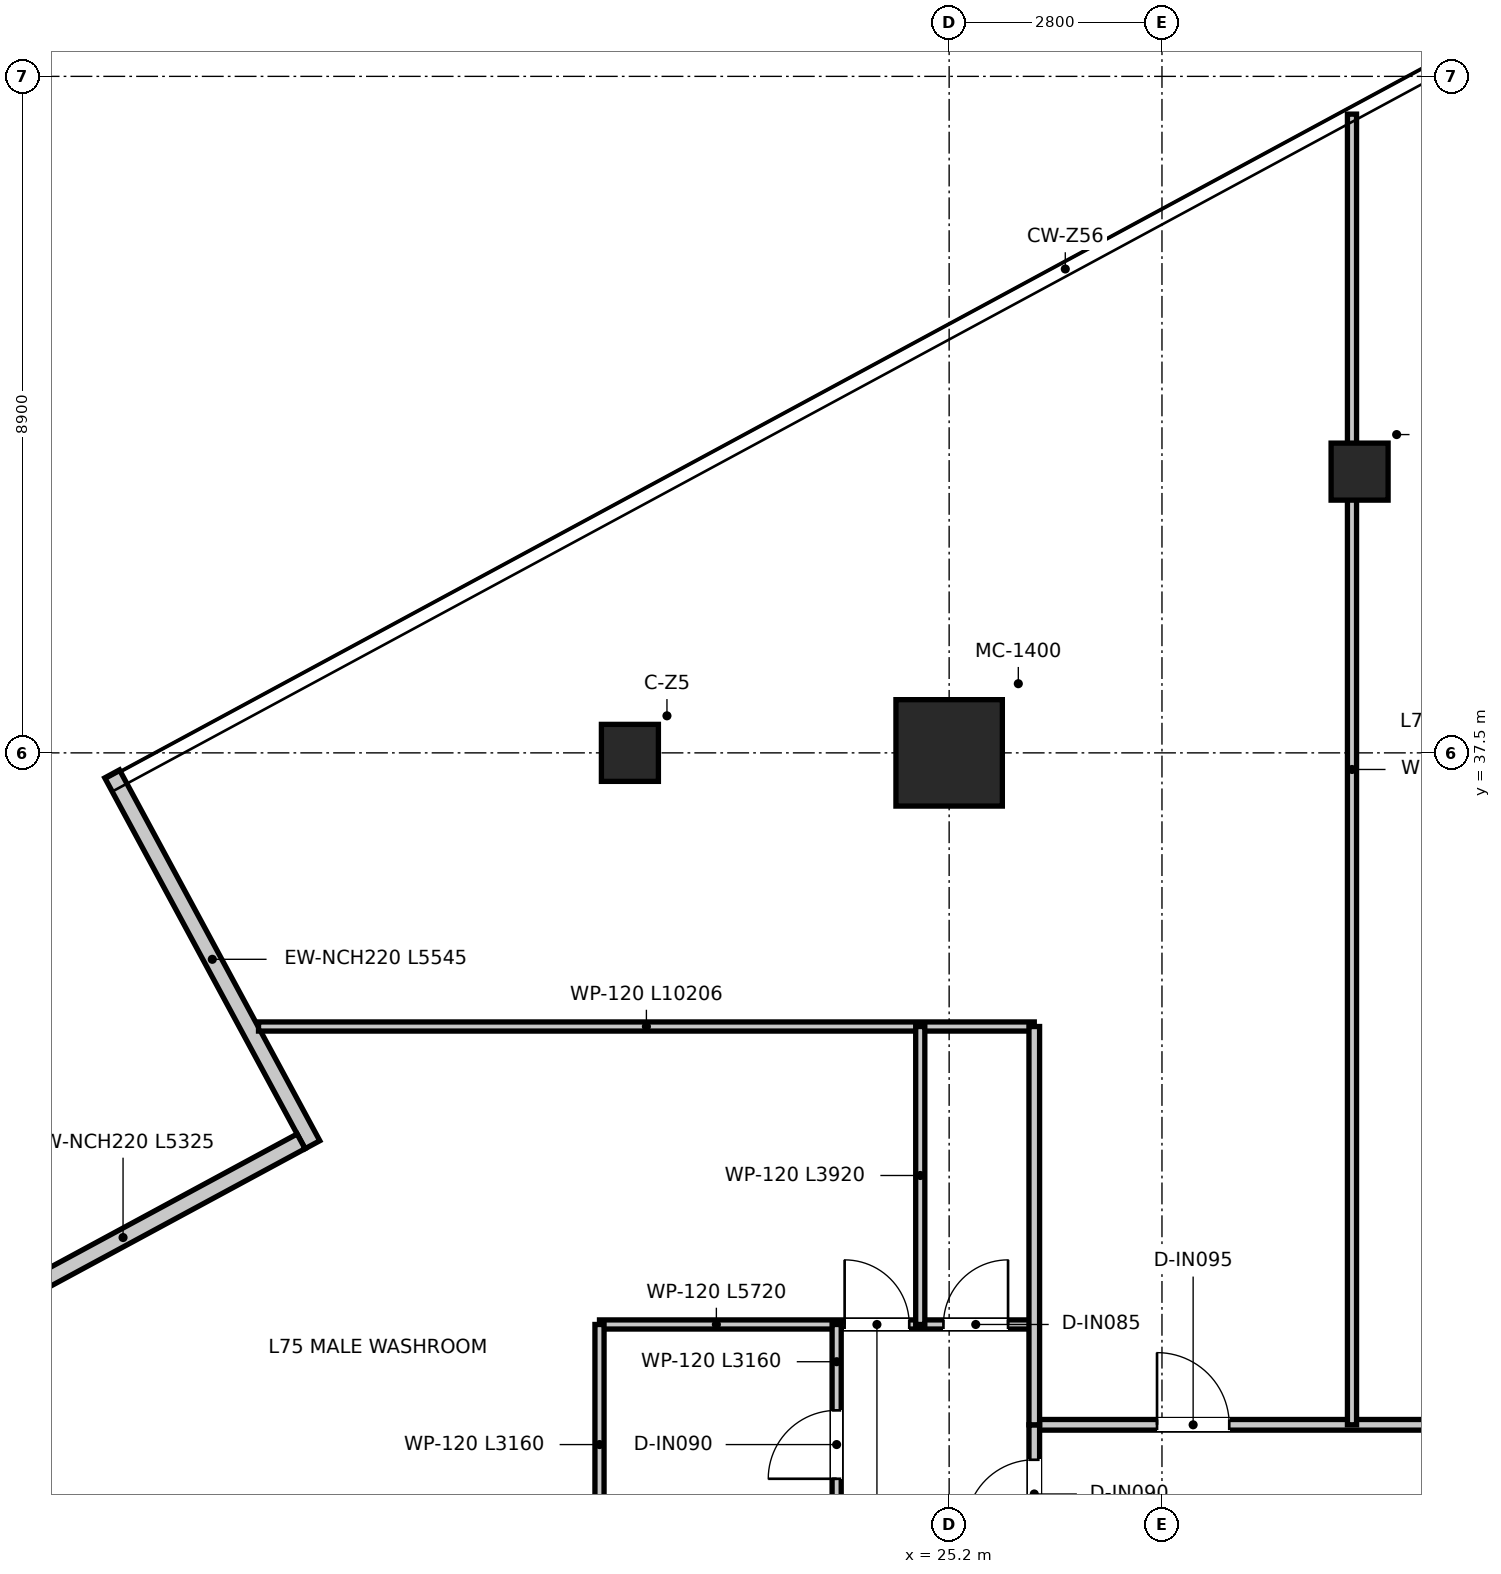
"""IFC4 building model, lengths in metres.
Left out: names, types, materials, properties, quantities, classifications, styles, units other than length and angle.
Written with IfcOpenShell. Run it as: python <this file> out.ifc"""

import sys

from ifc_helpers import new_model, si_unit, direction, frame, frame_2d, origin, origin_2d, place, context, subcontext, project, spatial, rectangle, extrude, source, transform, mapped, element, fill, save


model = new_model("IFC4")
c1 = context("Model", 3, precision=1e-05, world=origin(), true_north=direction((0.0, 1.0)))
c2 = subcontext(c1, "Body", "Model", "MODEL_VIEW")
j1 = project(units=[si_unit("LENGTHUNIT", "METRE"), si_unit("PLANEANGLEUNIT", "RADIAN")], contexts=[c1])
p1 = place(None, origin())
s1 = spatial("IfcSite", under=j1, at=p1, CompositionType="ELEMENT")
p2 = place(p1, origin())
s2 = spatial("IfcBuilding", under=s1, at=p2, CompositionType="ELEMENT")
p3 = place(p2, frame((0.0, 0.0, 306.9)))
s3 = spatial("IfcBuildingStorey", under=s2, at=p3, CompositionType="ELEMENT", Elevation=306.9)
m1 = source(origin(), c2, "Body", "SweptSolid", [
    extrude(rectangle(XDim=1.4, YDim=1.4, at=origin_2d()), origin(), (0.0, 0.0, 1.0), 3.95),
])
p4 = place(p3, frame((25.2, 37.5, 0.0), z_axis=(0.0, 0.0, 1.0), x_axis=(1.0, 0.0, 0.0)))
e1 = element("IfcColumn", 1, at=p4, inside=s3, PredefinedType="USERDEFINED", context=c2, shape_type="MappedRepresentation", body=[
    mapped(m1, transform((0.0, 0.0, 0.0), x_axis=(1.0, 0.0, 0.0), y_axis=(0.0, 1.0, 0.0), z_axis=(0.0, 0.0, 1.0), scale=1.0)),
])
m2 = source(origin(), c2, "Body", "SweptSolid", [
    extrude(rectangle(XDim=0.75, YDim=0.75, at=origin_2d()), origin(), (0.0, 0.0, 1.0), 3.95),
])
for number, where, z_axis, x_axis in (
    (2, (21.0, 37.5, 0.0), (0.0, 0.0, 1.0), (1.0, 0.0, 0.0)),
    (3, (30.6, 41.2, 0.0), (0.0, 0.0, 1.0), (1.0, 0.0, 0.0)),
):
    element("IfcColumn", number, at=place(p3, frame(where, z_axis=z_axis, x_axis=x_axis)), inside=s3, PredefinedType="COLUMN", context=c2, shape_type="MappedRepresentation", body=[
        mapped(m2, transform((0.0, 0.0, 0.0), x_axis=(1.0, 0.0, 0.0), y_axis=(0.0, 1.0, 0.0), z_axis=(0.0, 0.0, 1.0), scale=1.0)),
    ])
p5 = place(p3, frame((14.188, 37.223, 0.0), z_axis=(0.0, 0.0, 1.0), x_axis=(0.475257315172, -0.879846852796, 0.0)))
e4 = element("IfcWall", 4, at=p5, inside=s3, PredefinedType="ELEMENTEDWALL", context=c2, shape_type="SweptSolid", body=[
    extrude(rectangle(XDim=5.545, YDim=0.22, at=frame_2d((2.772, 0.0))), origin(), (0.0, 0.0, 1.0), 3.67),
])
p6 = place(p3, frame((16.674, 32.389, 0.0), z_axis=(0.0, 0.0, 1.0), x_axis=(-0.879859387449, -0.475234108958, 0.0)))
e5 = element("IfcWall", 5, at=p6, inside=s3, PredefinedType="ELEMENTEDWALL", context=c2, shape_type="SweptSolid", body=[
    extrude(rectangle(XDim=5.325, YDim=0.22, at=frame_2d((2.662, 0.0))), origin(), (0.0, 0.0, 1.0), 3.67),
])
p7 = place(p3, frame((26.32, 28.66, 0.0), z_axis=(0.0, 0.0, 1.0), x_axis=(1.0, 0.0, 0.0)))
e6 = element("IfcWall", 6, at=p7, inside=s3, PredefinedType="PARTITIONING", context=c2, shape_type="SweptSolid", body=[
    extrude(rectangle(XDim=19.36, YDim=0.14, at=frame_2d((9.68, 0.0))), origin(), (0.0, 0.0, 1.0), 3.18),
])
p8 = place(p7, frame((1.615, 0.0, 0.0)))
e7 = element("IfcOpeningElement", 7, at=p8, cuts=e6, PredefinedType="OPENING", context=c2, shape_type="SweptSolid", body=[
    extrude(rectangle(XDim=0.95, YDim=2.1, at=frame_2d((0.475, 1.05))), frame((0.0, 0.08, 0.0), z_axis=(0.0, -1.0, 0.0), x_axis=(1.0, 0.0, 0.0)), (0.0, 0.0, 1.0), 0.16),
])
p9 = place(p7, frame((6.455, 0.0, 0.0)))
e8 = element("IfcOpeningElement", 8, at=p9, cuts=e6, PredefinedType="OPENING", context=c2, shape_type="SweptSolid", body=[
    extrude(rectangle(XDim=0.95, YDim=2.1, at=frame_2d((0.475, 1.05))), frame((0.0, 0.08, 0.0), z_axis=(0.0, -1.0, 0.0), x_axis=(1.0, 0.0, 0.0)), (0.0, 0.0, 1.0), 0.16),
])
p10 = place(p7, frame((11.955, 0.0, 0.0)))
e9 = element("IfcOpeningElement", 9, at=p10, cuts=e6, PredefinedType="OPENING", context=c2, shape_type="SweptSolid", body=[
    extrude(rectangle(XDim=0.95, YDim=2.1, at=frame_2d((0.475, 1.05))), frame((0.0, 0.08, 0.0), z_axis=(0.0, -1.0, 0.0), x_axis=(1.0, 0.0, 0.0)), (0.0, 0.0, 1.0), 0.16),
])
p11 = place(p7, frame((16.795, 0.0, 0.0)))
e10 = element("IfcOpeningElement", 10, at=p11, cuts=e6, PredefinedType="OPENING", context=c2, shape_type="SweptSolid", body=[
    extrude(rectangle(XDim=0.95, YDim=2.1, at=frame_2d((0.475, 1.05))), frame((0.0, 0.08, 0.0), z_axis=(0.0, -1.0, 0.0), x_axis=(1.0, 0.0, 0.0)), (0.0, 0.0, 1.0), 0.16),
])
p12 = place(p3, frame((26.32, 9.0, 0.0), z_axis=(0.0, 0.0, 1.0), x_axis=(0.0, 1.0, 0.0)))
e11 = element("IfcWall", 11, at=p12, inside=s3, PredefinedType="PARTITIONING", context=c2, shape_type="SweptSolid", body=[
    extrude(rectangle(XDim=19.66, YDim=0.14, at=frame_2d((9.83, 0.0))), origin(), (0.0, 0.0, 1.0), 3.13),
])
p13 = place(p12, frame((18.3, 0.0, 0.0)))
e12 = element("IfcOpeningElement", 12, at=p13, cuts=e11, PredefinedType="OPENING", context=c2, shape_type="SweptSolid", body=[
    extrude(rectangle(XDim=0.9, YDim=2.1, at=frame_2d((0.45, 1.05))), frame((0.0, 0.08, 0.0), z_axis=(0.0, -1.0, 0.0), x_axis=(1.0, 0.0, 0.0)), (0.0, 0.0, 1.0), 0.16),
])
p14 = place(p12, frame((1.95, 0.0, 0.0)))
e13 = element("IfcOpeningElement", 13, at=p14, cuts=e11, PredefinedType="OPENING", context=c2, shape_type="SweptSolid", body=[
    extrude(rectangle(XDim=0.9, YDim=2.1, at=frame_2d((0.45, 1.05))), frame((0.0, 0.08, 0.0), z_axis=(0.0, -1.0, 0.0), x_axis=(1.0, 0.0, 0.0)), (0.0, 0.0, 1.0), 0.16),
])
p15 = place(p12, frame((10.3, 0.0, 0.0)))
e14 = element("IfcOpeningElement", 14, at=p15, cuts=e11, PredefinedType="OPENING", context=c2, shape_type="SweptSolid", body=[
    extrude(rectangle(XDim=0.9, YDim=2.1, at=frame_2d((0.45, 1.05))), frame((0.0, 0.08, 0.0), z_axis=(0.0, -1.0, 0.0), x_axis=(1.0, 0.0, 0.0)), (0.0, 0.0, 1.0), 0.16),
])
p16 = place(p12, frame((14.96, 0.0, 0.0)))
e15 = element("IfcOpeningElement", 15, at=p16, cuts=e11, PredefinedType="OPENING", context=c2, shape_type="SweptSolid", body=[
    extrude(rectangle(XDim=0.9, YDim=2.1, at=frame_2d((0.45, 1.05))), frame((0.0, 0.08, 0.0), z_axis=(0.0, -1.0, 0.0), x_axis=(1.0, 0.0, 0.0)), (0.0, 0.0, 1.0), 0.16),
])
p17 = place(p3, frame((16.114, 33.9, 0.0), z_axis=(0.0, 0.0, 1.0), x_axis=(1.0, 0.0, 0.0)))
e16 = element("IfcWall", 16, at=p17, inside=s3, PredefinedType="PARTITIONING", context=c2, shape_type="SweptSolid", body=[
    extrude(rectangle(XDim=10.206, YDim=0.12, at=frame_2d((5.103, 0.0))), origin(), (0.0, 0.0, 1.0), 3.13),
])
p18 = place(p3, frame((20.6, 29.98, 0.0), z_axis=(0.0, 0.0, 1.0), x_axis=(1.0, 0.0, 0.0)))
e17 = element("IfcWall", 17, at=p18, inside=s3, PredefinedType="PARTITIONING", context=c2, shape_type="SweptSolid", body=[
    extrude(rectangle(XDim=5.72, YDim=0.12, at=frame_2d((2.86, 0.0))), origin(), (0.0, 0.0, 1.0), 3.13),
])
p19 = place(p18, frame((3.225, 0.0, 0.0)))
e18 = element("IfcOpeningElement", 18, at=p19, cuts=e17, PredefinedType="OPENING", context=c2, shape_type="SweptSolid", body=[
    extrude(rectangle(XDim=0.85, YDim=2.1, at=frame_2d((0.425, 1.05))), frame((0.0, 0.07, 0.0), z_axis=(0.0, -1.0, 0.0), x_axis=(1.0, 0.0, 0.0)), (0.0, 0.0, 1.0), 0.14),
])
p20 = place(p18, frame((4.525, 0.0, 0.0)))
e19 = element("IfcOpeningElement", 19, at=p20, cuts=e17, PredefinedType="OPENING", context=c2, shape_type="SweptSolid", body=[
    extrude(rectangle(XDim=0.85, YDim=2.1, at=frame_2d((0.425, 1.05))), frame((0.0, 0.07, 0.0), z_axis=(0.0, -1.0, 0.0), x_axis=(1.0, 0.0, 0.0)), (0.0, 0.0, 1.0), 0.14),
])
p21 = place(p3, frame((20.6, 26.82, 0.0), z_axis=(0.0, 0.0, 1.0), x_axis=(0.0, 1.0, 0.0)))
e20 = element("IfcWall", 20, at=p21, inside=s3, PredefinedType="PARTITIONING", context=c2, shape_type="SweptSolid", body=[
    extrude(rectangle(XDim=3.16, YDim=0.12, at=frame_2d((1.58, 0.0))), origin(), (0.0, 0.0, 1.0), 3.67),
])
p22 = place(p3, frame((23.72, 26.82, 0.0), z_axis=(0.0, 0.0, 1.0), x_axis=(0.0, 1.0, 0.0)))
e21 = element("IfcWall", 21, at=p22, inside=s3, PredefinedType="PARTITIONING", context=c2, shape_type="SweptSolid", body=[
    extrude(rectangle(XDim=3.16, YDim=0.12, at=frame_2d((1.58, 0.0))), origin(), (0.0, 0.0, 1.0), 3.18),
])
p23 = place(p22, frame((1.13, 0.0, 0.0)))
e22 = element("IfcOpeningElement", 22, at=p23, cuts=e21, PredefinedType="OPENING", context=c2, shape_type="SweptSolid", body=[
    extrude(rectangle(XDim=0.9, YDim=2.1, at=frame_2d((0.45, 1.05))), frame((0.0, 0.07, 0.0), z_axis=(0.0, -1.0, 0.0), x_axis=(1.0, 0.0, 0.0)), (0.0, 0.0, 1.0), 0.14),
])
p24 = place(p3, frame((24.82, 29.98, 0.0), z_axis=(0.0, 0.0, 1.0), x_axis=(0.0, 1.0, 0.0)))
e23 = element("IfcWall", 23, at=p24, inside=s3, PredefinedType="PARTITIONING", context=c2, shape_type="SweptSolid", body=[
    extrude(rectangle(XDim=3.92, YDim=0.12, at=frame_2d((1.96, 0.0))), origin(), (0.0, 0.0, 1.0), 3.31),
])
p25 = place(p3, frame((26.32, 28.66, 0.0), z_axis=(0.0, 0.0, 1.0), x_axis=(0.0, 1.0, 0.0)))
e24 = element("IfcWall", 24, at=p25, inside=s3, PredefinedType="PARTITIONING", context=c2, shape_type="SweptSolid", body=[
    extrude(rectangle(XDim=5.24, YDim=0.14, at=frame_2d((2.62, 0.0))), origin(), (0.0, 0.0, 1.0), 3.43),
])
p26 = place(p3, frame((30.5, 28.66, 0.0), z_axis=(0.0, 0.0, 1.0), x_axis=(0.0, 1.0, 0.0)))
e25 = element("IfcWall", 25, at=p26, inside=s3, PredefinedType="PARTITIONING", context=c2, shape_type="SweptSolid", body=[
    extrude(rectangle(XDim=17.243, YDim=0.12, at=frame_2d((8.622, 0.0))), origin(), (0.0, 0.0, 1.0), 3.13),
])
p27 = place(p13, origin())
e26 = element("IfcDoor", 26, at=p27, inside=s3, OperationType="SINGLE_SWING_LEFT", PredefinedType="DOOR", context=c2, shape_type="SweptSolid", body=[
    extrude(rectangle(XDim=0.9, YDim=2.1, at=frame_2d((0.45, 1.05))), frame((0.0, 0.025, 0.0), z_axis=(0.0, -1.0, 0.0), x_axis=(1.0, 0.0, 0.0)), (0.0, 0.0, 1.0), 0.05),
])
fill(e12, e26)
p28 = place(p19, origin())
e27 = element("IfcDoor", 27, at=p28, inside=s3, OperationType="SINGLE_SWING_LEFT", PredefinedType="DOOR", context=c2, shape_type="SweptSolid", body=[
    extrude(rectangle(XDim=0.85, YDim=2.1, at=frame_2d((0.425, 1.05))), frame((0.0, 0.025, 0.0), z_axis=(0.0, -1.0, 0.0), x_axis=(1.0, 0.0, 0.0)), (0.0, 0.0, 1.0), 0.05),
])
fill(e18, e27)
p29 = place(p20, origin())
e28 = element("IfcDoor", 28, at=p29, inside=s3, OperationType="SINGLE_SWING_RIGHT", PredefinedType="DOOR", context=c2, shape_type="SweptSolid", body=[
    extrude(rectangle(XDim=0.85, YDim=2.1, at=frame_2d((0.425, 1.05))), frame((0.0, 0.025, 0.0), z_axis=(0.0, -1.0, 0.0), x_axis=(1.0, 0.0, 0.0)), (0.0, 0.0, 1.0), 0.05),
])
fill(e19, e28)
p30 = place(p23, origin())
e29 = element("IfcDoor", 29, at=p30, inside=s3, OperationType="SINGLE_SWING_LEFT", PredefinedType="DOOR", context=c2, shape_type="SweptSolid", body=[
    extrude(rectangle(XDim=0.9, YDim=2.1, at=frame_2d((0.45, 1.05))), frame((0.0, 0.025, 0.0), z_axis=(0.0, -1.0, 0.0), x_axis=(1.0, 0.0, 0.0)), (0.0, 0.0, 1.0), 0.05),
])
fill(e22, e29)
p31 = place(p8, origin())
e30 = element("IfcDoor", 30, at=p31, inside=s3, OperationType="SINGLE_SWING_LEFT", PredefinedType="DOOR", context=c2, shape_type="SweptSolid", body=[
    extrude(rectangle(XDim=0.95, YDim=2.1, at=frame_2d((0.475, 1.05))), frame((0.0, 0.025, 0.0), z_axis=(0.0, -1.0, 0.0), x_axis=(1.0, 0.0, 0.0)), (0.0, 0.0, 1.0), 0.05),
])
fill(e7, e30)
save(model, sys.argv[1])
